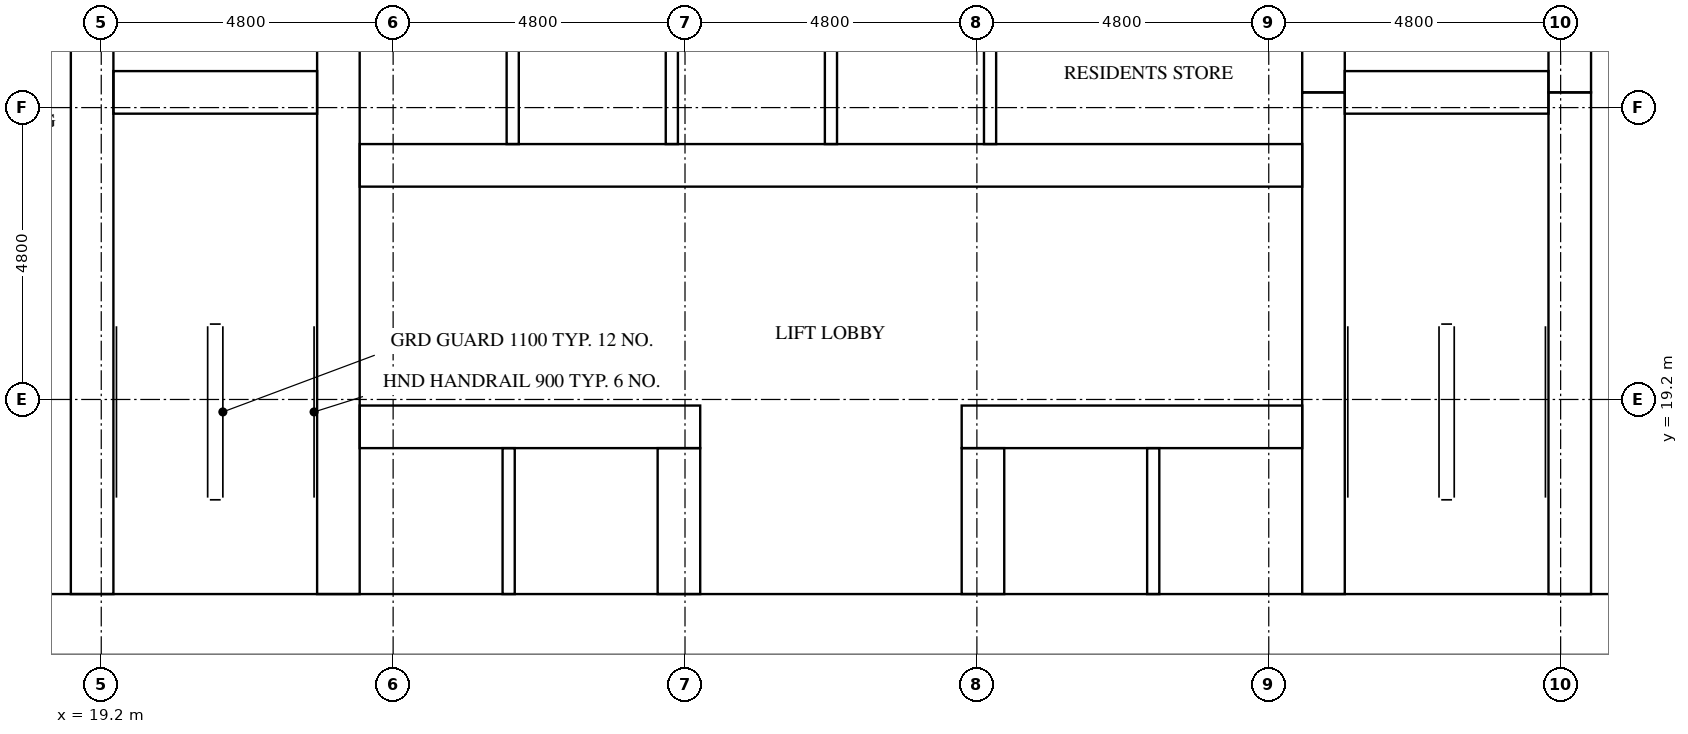
"""IFC4 building model, lengths in metres.
Left out: names, types, materials, properties, quantities, classifications, styles, units other than length and angle.
Written with IfcOpenShell. Run it as: python <this file> out.ifc"""

import sys

from ifc_helpers import new_model, si_unit, direction, frame, frame_2d, origin, place, context, subcontext, project, spatial, rectangle, extrude, element, fill, save


model = new_model("IFC4")
c1 = context("Model", 3, precision=1e-05, world=origin(), true_north=direction((0.0, 1.0)))
c2 = subcontext(c1, "Body", "Model", "MODEL_VIEW")
j1 = project(units=[si_unit("LENGTHUNIT", "METRE"), si_unit("PLANEANGLEUNIT", "RADIAN")], contexts=[c1])
p1 = place(None, origin())
s1 = spatial("IfcSite", under=j1, at=p1, CompositionType="ELEMENT")
p2 = place(p1, origin())
s2 = spatial("IfcBuilding", under=s1, at=p2, CompositionType="ELEMENT")
p3 = place(p2, frame((0.0, 0.0, 50.4)))
s3 = spatial("IfcBuildingStorey", under=s2, at=p3, CompositionType="ELEMENT", Elevation=50.4)
p4 = place(p3, frame((15.0, 15.5, 0.0), z_axis=(0.0, 0.0, 1.0), x_axis=(1.0, 0.0, 0.0)))
e1 = element("IfcWall", 1, at=p4, inside=s3, PredefinedType="SHEAR", context=c2, shape_type="SweptSolid", body=[
    extrude(rectangle(XDim=32.4, YDim=1.0, at=frame_2d((16.2, 0.0))), origin(), (0.0, 0.0, 1.0), 3.1),
])
p5 = place(p4, frame((15.3, 0.0, 0.0)))
e2 = element("IfcOpeningElement", 2, at=p5, cuts=e1, PredefinedType="OPENING", context=c2, shape_type="SweptSolid", body=[
    extrude(rectangle(XDim=1.8, YDim=2.1, at=frame_2d((0.9, 1.05))), frame((0.0, 0.51, 0.0), z_axis=(0.0, -1.0, 0.0), x_axis=(1.0, 0.0, 0.0)), (0.0, 0.0, 1.0), 1.02),
])
p6 = place(p3, frame((19.05, 16.0, 0.0), z_axis=(0.0, 0.0, 1.0), x_axis=(0.0, 1.0, 0.0)))
e3 = element("IfcWall", 3, at=p6, inside=s3, PredefinedType="SHEAR", context=c2, shape_type="SweptSolid", body=[
    extrude(rectangle(XDim=14.9, YDim=0.7, at=frame_2d((7.45, 0.0))), origin(), (0.0, 0.0, 1.0), 3.1),
])
p7 = place(p6, frame((9.45, 0.0, 0.0)))
e4 = element("IfcOpeningElement", 4, at=p7, cuts=e3, PredefinedType="OPENING", context=c2, shape_type="SweptSolid", body=[
    extrude(rectangle(XDim=1.1, YDim=2.1, at=frame_2d((0.55, 1.05))), frame((0.0, 0.36, 0.0), z_axis=(0.0, -1.0, 0.0), x_axis=(1.0, 0.0, 0.0)), (0.0, 0.0, 1.0), 0.72),
])
p8 = place(p6, frame((12.95, 0.0, 0.0)))
e5 = element("IfcOpeningElement", 5, at=p8, cuts=e3, PredefinedType="OPENING", context=c2, shape_type="SweptSolid", body=[
    extrude(rectangle(XDim=1.1, YDim=2.1, at=frame_2d((0.55, 1.05))), frame((0.0, 0.36, 0.0), z_axis=(0.0, -1.0, 0.0), x_axis=(1.0, 0.0, 0.0)), (0.0, 0.0, 1.0), 0.72),
])
p9 = place(p6, frame((0.2, 0.0, 0.0)))
e6 = element("IfcOpeningElement", 6, at=p9, cuts=e3, PredefinedType="OPENING", context=c2, shape_type="SweptSolid", body=[
    extrude(rectangle(XDim=1.2, YDim=2.1, at=frame_2d((0.6, 1.05))), frame((0.0, 0.36, 0.0), z_axis=(0.0, -1.0, 0.0), x_axis=(1.0, 0.0, 0.0)), (0.0, 0.0, 1.0), 0.72),
])
p10 = place(p3, frame((23.1, 16.0, 0.0), z_axis=(0.0, 0.0, 1.0), x_axis=(0.0, 1.0, 0.0)))
e7 = element("IfcWall", 7, at=p10, inside=s3, PredefinedType="SHEAR", context=c2, shape_type="SweptSolid", body=[
    extrude(rectangle(XDim=20.8, YDim=0.7, at=frame_2d((10.4, 0.0))), origin(), (0.0, 0.0, 1.0), 3.1),
])
p11 = place(p3, frame((39.3, 16.0, 0.0), z_axis=(0.0, 0.0, 1.0), x_axis=(0.0, 1.0, 0.0)))
e8 = element("IfcWall", 8, at=p11, inside=s3, PredefinedType="SHEAR", context=c2, shape_type="SweptSolid", body=[
    extrude(rectangle(XDim=8.25, YDim=0.7, at=frame_2d((4.125, 0.0))), origin(), (0.0, 0.0, 1.0), 3.1),
])
p12 = place(p3, frame((39.3, 24.25, 0.0), z_axis=(0.0, 0.0, 1.0), x_axis=(0.0, 1.0, 0.0)))
e9 = element("IfcWall", 9, at=p12, inside=s3, PredefinedType="SHEAR", context=c2, shape_type="SweptSolid", body=[
    extrude(rectangle(XDim=3.5, YDim=0.7, at=frame_2d((1.75, 0.0))), origin(), (0.0, 0.0, 1.0), 3.1),
])
p13 = place(p3, frame((43.35, 16.0, 0.0), z_axis=(0.0, 0.0, 1.0), x_axis=(0.0, 1.0, 0.0)))
e10 = element("IfcWall", 10, at=p13, inside=s3, PredefinedType="SHEAR", context=c2, shape_type="SweptSolid", body=[
    extrude(rectangle(XDim=8.25, YDim=0.7, at=frame_2d((4.125, 0.0))), origin(), (0.0, 0.0, 1.0), 3.1),
])
p14 = place(p13, frame((0.2, 0.0, 0.0)))
e11 = element("IfcOpeningElement", 11, at=p14, cuts=e10, PredefinedType="OPENING", context=c2, shape_type="SweptSolid", body=[
    extrude(rectangle(XDim=1.2, YDim=2.1, at=frame_2d((0.6, 1.05))), frame((0.0, 0.36, 0.0), z_axis=(0.0, -1.0, 0.0), x_axis=(1.0, 0.0, 0.0)), (0.0, 0.0, 1.0), 0.72),
])
p15 = place(p3, frame((43.35, 24.25, 0.0), z_axis=(0.0, 0.0, 1.0), x_axis=(0.0, 1.0, 0.0)))
e12 = element("IfcWall", 12, at=p15, inside=s3, PredefinedType="SHEAR", context=c2, shape_type="SweptSolid", body=[
    extrude(rectangle(XDim=3.5, YDim=0.7, at=frame_2d((1.75, 0.0))), origin(), (0.0, 0.0, 1.0), 3.1),
])
p16 = place(p15, frame((1.2, 0.0, 0.0)))
e13 = element("IfcOpeningElement", 13, at=p16, cuts=e12, PredefinedType="OPENING", context=c2, shape_type="SweptSolid", body=[
    extrude(rectangle(XDim=1.1, YDim=2.1, at=frame_2d((0.55, 1.05))), frame((0.0, 0.36, 0.0), z_axis=(0.0, -1.0, 0.0), x_axis=(1.0, 0.0, 0.0)), (0.0, 0.0, 1.0), 0.72),
])
for number, where, z_axis, x_axis in (
    (14, (19.4, 24.25, 0.0), (0.0, 0.0, 1.0), (1.0, 0.0, 0.0)),
    (15, (39.65, 24.25, 0.0), (0.0, 0.0, 1.0), (1.0, 0.0, 0.0)),
):
    element("IfcWall", number, at=place(p3, frame(where, z_axis=z_axis, x_axis=x_axis)), inside=s3, PredefinedType="SHEAR", context=c2, shape_type="SweptSolid", body=[
        extrude(rectangle(XDim=3.35, YDim=0.7, at=frame_2d((1.675, 0.0))), origin(), (0.0, 0.0, 1.0), 3.1),
    ])
p17 = place(p3, frame((23.45, 18.75, 0.0), z_axis=(0.0, 0.0, 1.0), x_axis=(1.0, 0.0, 0.0)))
e16 = element("IfcWall", 16, at=p17, inside=s3, PredefinedType="SHEAR", context=c2, shape_type="SweptSolid", body=[
    extrude(rectangle(XDim=5.6, YDim=0.7, at=frame_2d((2.8, 0.0))), origin(), (0.0, 0.0, 1.0), 3.1),
])
p18 = place(p17, frame((0.625, 0.0, 0.0)))
e17 = element("IfcOpeningElement", 17, at=p18, cuts=e16, PredefinedType="OPENING", context=c2, shape_type="SweptSolid", body=[
    extrude(rectangle(XDim=1.1, YDim=2.1, at=frame_2d((0.55, 1.05))), frame((0.0, 0.36, 0.0), z_axis=(0.0, -1.0, 0.0), x_axis=(1.0, 0.0, 0.0)), (0.0, 0.0, 1.0), 0.72),
])
p19 = place(p17, frame((3.175, 0.0, 0.0)))
e18 = element("IfcOpeningElement", 18, at=p19, cuts=e16, PredefinedType="OPENING", context=c2, shape_type="SweptSolid", body=[
    extrude(rectangle(XDim=1.1, YDim=2.1, at=frame_2d((0.55, 1.05))), frame((0.0, 0.36, 0.0), z_axis=(0.0, -1.0, 0.0), x_axis=(1.0, 0.0, 0.0)), (0.0, 0.0, 1.0), 0.72),
])
p20 = place(p3, frame((33.35, 18.75, 0.0), z_axis=(0.0, 0.0, 1.0), x_axis=(1.0, 0.0, 0.0)))
e19 = element("IfcWall", 19, at=p20, inside=s3, PredefinedType="SHEAR", context=c2, shape_type="SweptSolid", body=[
    extrude(rectangle(XDim=5.6, YDim=0.7, at=frame_2d((2.8, 0.0))), origin(), (0.0, 0.0, 1.0), 3.1),
])
p21 = place(p20, frame((1.325, 0.0, 0.0)))
e20 = element("IfcOpeningElement", 20, at=p21, cuts=e19, PredefinedType="OPENING", context=c2, shape_type="SweptSolid", body=[
    extrude(rectangle(XDim=1.1, YDim=2.1, at=frame_2d((0.55, 1.05))), frame((0.0, 0.36, 0.0), z_axis=(0.0, -1.0, 0.0), x_axis=(1.0, 0.0, 0.0)), (0.0, 0.0, 1.0), 0.72),
])
p22 = place(p20, frame((3.875, 0.0, 0.0)))
e21 = element("IfcOpeningElement", 21, at=p22, cuts=e19, PredefinedType="OPENING", context=c2, shape_type="SweptSolid", body=[
    extrude(rectangle(XDim=1.1, YDim=2.1, at=frame_2d((0.55, 1.05))), frame((0.0, 0.36, 0.0), z_axis=(0.0, -1.0, 0.0), x_axis=(1.0, 0.0, 0.0)), (0.0, 0.0, 1.0), 0.72),
])
p23 = place(p3, frame((23.45, 23.05, 0.0), z_axis=(0.0, 0.0, 1.0), x_axis=(1.0, 0.0, 0.0)))
e22 = element("IfcWall", 22, at=p23, inside=s3, PredefinedType="SHEAR", context=c2, shape_type="SweptSolid", body=[
    extrude(rectangle(XDim=15.5, YDim=0.7, at=frame_2d((7.75, 0.0))), origin(), (0.0, 0.0, 1.0), 3.1),
])
p24 = place(p23, frame((0.658, 0.0, 0.0)))
e23 = element("IfcOpeningElement", 23, at=p24, cuts=e22, PredefinedType="OPENING", context=c2, shape_type="SweptSolid", body=[
    extrude(rectangle(XDim=1.1, YDim=2.1, at=frame_2d((0.55, 1.05))), frame((0.0, 0.36, 0.0), z_axis=(0.0, -1.0, 0.0), x_axis=(1.0, 0.0, 0.0)), (0.0, 0.0, 1.0), 0.72),
])
p25 = place(p23, frame((3.275, 0.0, 0.0)))
e24 = element("IfcOpeningElement", 24, at=p25, cuts=e22, PredefinedType="OPENING", context=c2, shape_type="SweptSolid", body=[
    extrude(rectangle(XDim=1.1, YDim=2.1, at=frame_2d((0.55, 1.05))), frame((0.0, 0.36, 0.0), z_axis=(0.0, -1.0, 0.0), x_axis=(1.0, 0.0, 0.0)), (0.0, 0.0, 1.0), 0.72),
])
p26 = place(p23, frame((12.483, 0.0, 0.0)))
e25 = element("IfcOpeningElement", 25, at=p26, cuts=e22, PredefinedType="OPENING", context=c2, shape_type="SweptSolid", body=[
    extrude(rectangle(XDim=1.0, YDim=2.1, at=frame_2d((0.5, 1.05))), frame((0.0, 0.36, 0.0), z_axis=(0.0, -1.0, 0.0), x_axis=(1.0, 0.0, 0.0)), (0.0, 0.0, 1.0), 0.72),
])
for number, where, z_axis, x_axis in (
    (26, (28.7, 16.0, 0.0), (0.0, 0.0, 1.0), (0.0, 1.0, 0.0)),
    (27, (33.7, 16.0, 0.0), (0.0, 0.0, 1.0), (0.0, 1.0, 0.0)),
):
    element("IfcWall", number, at=place(p3, frame(where, z_axis=z_axis, x_axis=x_axis)), inside=s3, PredefinedType="SHEAR", context=c2, shape_type="SweptSolid", body=[
        extrude(rectangle(XDim=2.4, YDim=0.7, at=frame_2d((1.2, 0.0))), origin(), (0.0, 0.0, 1.0), 3.1),
    ])
for number, where, z_axis, x_axis in (
    (28, (25.967, 23.4, 0.0), (0.0, 0.0, 1.0), (0.0, 1.0, 0.0)),
    (29, (28.583, 23.4, 0.0), (0.0, 0.0, 1.0), (0.0, 1.0, 0.0)),
    (30, (31.2, 23.4, 0.0), (0.0, 0.0, 1.0), (0.0, 1.0, 0.0)),
    (31, (33.817, 23.4, 0.0), (0.0, 0.0, 1.0), (0.0, 1.0, 0.0)),
):
    element("IfcWall", number, at=place(p3, frame(where, z_axis=z_axis, x_axis=x_axis)), inside=s3, PredefinedType="SOLIDWALL", context=c2, shape_type="SweptSolid", body=[
        extrude(rectangle(XDim=2.4, YDim=0.2, at=frame_2d((1.2, 0.0))), origin(), (0.0, 0.0, 1.0), 3.1),
    ])
for number, where, z_axis, x_axis in (
    (32, (25.9, 16.0, 0.0), (0.0, 0.0, 1.0), (0.0, 1.0, 0.0)),
    (33, (36.5, 16.0, 0.0), (0.0, 0.0, 1.0), (0.0, 1.0, 0.0)),
):
    element("IfcWall", number, at=place(p3, frame(where, z_axis=z_axis, x_axis=x_axis)), inside=s3, PredefinedType="SOLIDWALL", context=c2, shape_type="SweptSolid", body=[
        extrude(rectangle(XDim=2.4, YDim=0.2, at=frame_2d((1.2, 0.0))), origin(), (0.0, 0.0, 1.0), 3.1),
    ])
p27 = place(p18, origin())
e34 = element("IfcDoor", 34, at=p27, inside=s3, OperationType="DOUBLE_DOOR_SLIDING", PredefinedType="DOOR", context=c2, shape_type="SweptSolid", body=[
    extrude(rectangle(XDim=1.1, YDim=2.1, at=frame_2d((0.55, 1.05))), frame((0.0, 0.025, 0.0), z_axis=(0.0, -1.0, 0.0), x_axis=(1.0, 0.0, 0.0)), (0.0, 0.0, 1.0), 0.05),
])
fill(e17, e34)
p28 = place(p19, origin())
e35 = element("IfcDoor", 35, at=p28, inside=s3, OperationType="DOUBLE_DOOR_SLIDING", PredefinedType="DOOR", context=c2, shape_type="SweptSolid", body=[
    extrude(rectangle(XDim=1.1, YDim=2.1, at=frame_2d((0.55, 1.05))), frame((0.0, 0.025, 0.0), z_axis=(0.0, -1.0, 0.0), x_axis=(1.0, 0.0, 0.0)), (0.0, 0.0, 1.0), 0.05),
])
fill(e18, e35)
p29 = place(p21, origin())
e36 = element("IfcDoor", 36, at=p29, inside=s3, OperationType="DOUBLE_DOOR_SLIDING", PredefinedType="DOOR", context=c2, shape_type="SweptSolid", body=[
    extrude(rectangle(XDim=1.1, YDim=2.1, at=frame_2d((0.55, 1.05))), frame((0.0, 0.025, 0.0), z_axis=(0.0, -1.0, 0.0), x_axis=(1.0, 0.0, 0.0)), (0.0, 0.0, 1.0), 0.05),
])
fill(e20, e36)
p30 = place(p22, origin())
e37 = element("IfcDoor", 37, at=p30, inside=s3, OperationType="DOUBLE_DOOR_SLIDING", PredefinedType="DOOR", context=c2, shape_type="SweptSolid", body=[
    extrude(rectangle(XDim=1.1, YDim=2.1, at=frame_2d((0.55, 1.05))), frame((0.0, 0.025, 0.0), z_axis=(0.0, -1.0, 0.0), x_axis=(1.0, 0.0, 0.0)), (0.0, 0.0, 1.0), 0.05),
])
fill(e21, e37)
p31 = place(p24, origin())
e38 = element("IfcDoor", 38, at=p31, inside=s3, OperationType="DOUBLE_DOOR_SLIDING", PredefinedType="DOOR", context=c2, shape_type="SweptSolid", body=[
    extrude(rectangle(XDim=1.1, YDim=2.1, at=frame_2d((0.55, 1.05))), frame((0.0, 0.025, 0.0), z_axis=(0.0, -1.0, 0.0), x_axis=(1.0, 0.0, 0.0)), (0.0, 0.0, 1.0), 0.05),
])
fill(e23, e38)
p32 = place(p25, origin())
e39 = element("IfcDoor", 39, at=p32, inside=s3, OperationType="DOUBLE_DOOR_SLIDING", PredefinedType="DOOR", context=c2, shape_type="SweptSolid", body=[
    extrude(rectangle(XDim=1.1, YDim=2.1, at=frame_2d((0.55, 1.05))), frame((0.0, 0.025, 0.0), z_axis=(0.0, -1.0, 0.0), x_axis=(1.0, 0.0, 0.0)), (0.0, 0.0, 1.0), 0.05),
])
fill(e24, e39)
p33 = place(p9, frame((1.2, 0.0, 0.0), z_axis=(0.0, 0.0, 1.0), x_axis=(-1.0, 0.0, 0.0)))
e40 = element("IfcDoor", 40, at=p33, inside=s3, OperationType="SINGLE_SWING_RIGHT", PredefinedType="DOOR", context=c2, shape_type="SweptSolid", body=[
    extrude(rectangle(XDim=1.2, YDim=2.1, at=frame_2d((0.6, 1.05))), frame((0.0, 0.025, 0.0), z_axis=(0.0, -1.0, 0.0), x_axis=(1.0, 0.0, 0.0)), (0.0, 0.0, 1.0), 0.05),
])
fill(e6, e40)
p34 = place(p14, origin())
e41 = element("IfcDoor", 41, at=p34, inside=s3, OperationType="SINGLE_SWING_LEFT", PredefinedType="DOOR", context=c2, shape_type="SweptSolid", body=[
    extrude(rectangle(XDim=1.2, YDim=2.1, at=frame_2d((0.6, 1.05))), frame((0.0, 0.025, 0.0), z_axis=(0.0, -1.0, 0.0), x_axis=(1.0, 0.0, 0.0)), (0.0, 0.0, 1.0), 0.05),
])
fill(e11, e41)
p35 = place(p5, frame((1.8, 0.0, 0.0), z_axis=(0.0, 0.0, 1.0), x_axis=(-1.0, 0.0, 0.0)))
e42 = element("IfcDoor", 42, at=p35, inside=s3, OperationType="DOUBLE_DOOR_SINGLE_SWING", PredefinedType="DOOR", context=c2, shape_type="SweptSolid", body=[
    extrude(rectangle(XDim=1.8, YDim=2.1, at=frame_2d((0.9, 1.05))), frame((0.0, 0.025, 0.0), z_axis=(0.0, -1.0, 0.0), x_axis=(1.0, 0.0, 0.0)), (0.0, 0.0, 1.0), 0.05),
])
fill(e2, e42)
p36 = place(p26, frame((1.0, 0.0, 0.0), z_axis=(0.0, 0.0, 1.0), x_axis=(-1.0, 0.0, 0.0)))
e43 = element("IfcDoor", 43, at=p36, inside=s3, OperationType="SINGLE_SWING_LEFT", PredefinedType="DOOR", context=c2, shape_type="SweptSolid", body=[
    extrude(rectangle(XDim=1.0, YDim=2.1, at=frame_2d((0.5, 1.05))), frame((0.0, 0.025, 0.0), z_axis=(0.0, -1.0, 0.0), x_axis=(1.0, 0.0, 0.0)), (0.0, 0.0, 1.0), 0.05),
])
fill(e25, e43)
save(model, sys.argv[1])
